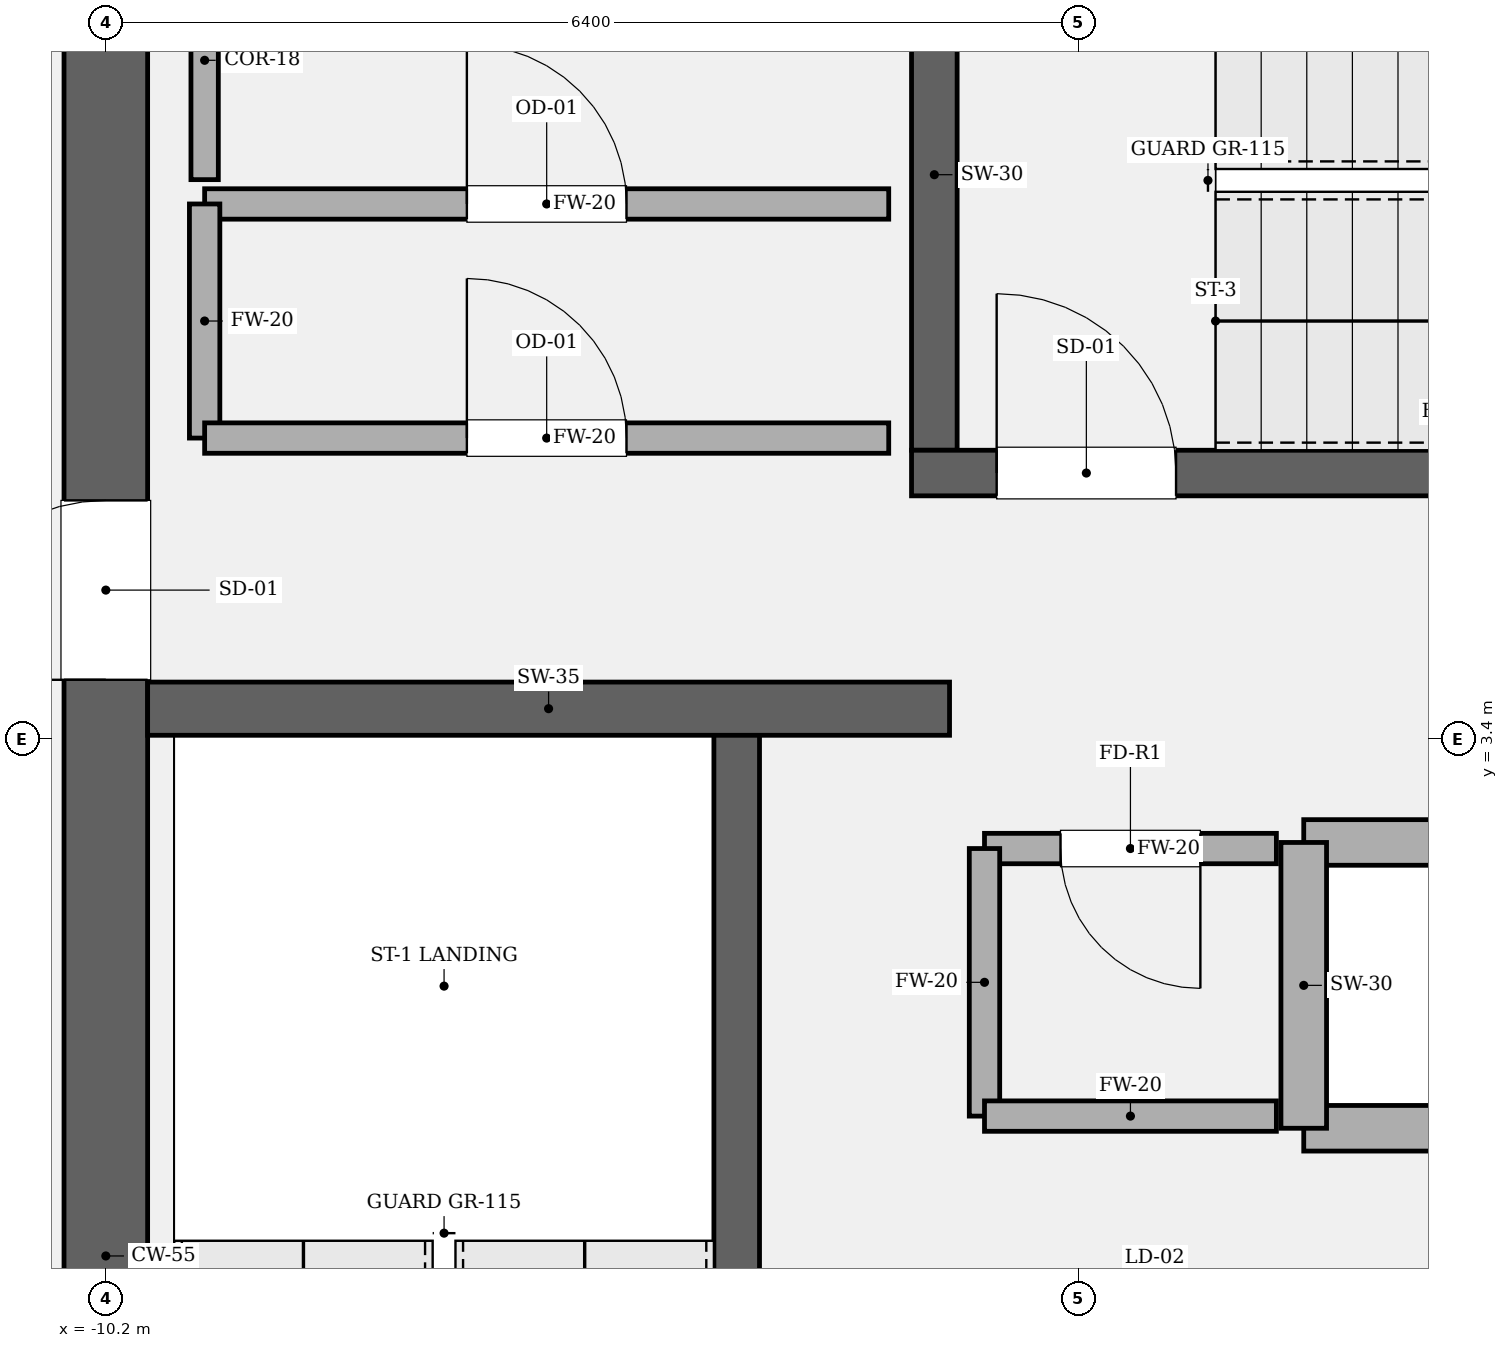
"""IFC4 building model, lengths in metres.
Left out: names, types, materials, properties, quantities, classifications, styles, units other than length and angle.
Written with IfcOpenShell. Run it as: python <this file> out.ifc"""

import sys

from ifc_helpers import new_model, si_unit, direction, frame, frame_2d, origin, place, context, subcontext, project, spatial, rectangle, extrude, element, fill, save


model = new_model("IFC4")
c1 = context("Model", 3, precision=1e-05, world=origin(), true_north=direction((0.0, 1.0)))
c2 = subcontext(c1, "Body", "Model", "MODEL_VIEW")
j1 = project(units=[si_unit("LENGTHUNIT", "METRE"), si_unit("PLANEANGLEUNIT", "RADIAN")], contexts=[c1])
p1 = place(None, origin())
s1 = spatial("IfcSite", under=j1, at=p1, CompositionType="ELEMENT")
p2 = place(p1, origin())
s2 = spatial("IfcBuilding", under=s1, at=p2, CompositionType="ELEMENT")
p3 = place(p2, frame((0.0, 0.0, 267.6)))
s3 = spatial("IfcBuildingStorey", under=s2, at=p3, CompositionType="ELEMENT", Elevation=267.6)
p4 = place(p3, frame((-10.2, -8.925, 0.0), z_axis=(0.0, 0.0, 1.0), x_axis=(0.0, 1.0, 0.0)))
e1 = element("IfcWall", 1, at=p4, inside=s3, PredefinedType="SHEAR", context=c2, shape_type="SweptSolid", body=[
    extrude(rectangle(XDim=17.85, YDim=0.55, at=frame_2d((8.925, 0.0))), origin(), (0.0, 0.0, 1.0), 4.05),
])
p5 = place(p4, frame((12.715, 0.0, 0.0)))
e2 = element("IfcOpeningElement", 2, at=p5, cuts=e1, PredefinedType="OPENING", context=c2, shape_type="SweptSolid", body=[
    extrude(rectangle(XDim=1.18, YDim=2.2, at=frame_2d((0.59, 1.1))), frame((0.0, 0.285, 0.0), z_axis=(0.0, -1.0, 0.0), x_axis=(1.0, 0.0, 0.0)), (0.0, 0.0, 1.0), 0.57),
])
p6 = place(p3, frame((-6.05, -5.5, 0.0), z_axis=(0.0, 0.0, 1.0), x_axis=(0.0, 1.0, 0.0)))
e3 = element("IfcWall", 3, at=p6, inside=s3, PredefinedType="SOLIDWALL", context=c2, shape_type="SweptSolid", body=[
    extrude(rectangle(XDim=8.95, YDim=0.3, at=frame_2d((4.475, 0.0))), origin(), (0.0, 0.0, 1.0), 4.05),
])
p7 = place(p3, frame((-4.75, 5.3, 0.0), z_axis=(0.0, 0.0, 1.0), x_axis=(0.0, 1.0, 0.0)))
e4 = element("IfcWall", 4, at=p7, inside=s3, PredefinedType="SOLIDWALL", context=c2, shape_type="SweptSolid", body=[
    extrude(rectangle(XDim=3.625, YDim=0.3, at=frame_2d((1.812, 0.0))), origin(), (0.0, 0.0, 1.0), 4.05),
])
p8 = place(p3, frame((-4.9, 5.15, 0.0), z_axis=(0.0, 0.0, 1.0), x_axis=(1.0, 0.0, 0.0)))
e5 = element("IfcWall", 5, at=p8, inside=s3, PredefinedType="SOLIDWALL", context=c2, shape_type="SweptSolid", body=[
    extrude(rectangle(XDim=9.8, YDim=0.3, at=frame_2d((4.9, 0.0))), origin(), (0.0, 0.0, 1.0), 4.05),
])
p9 = place(p8, frame((0.56, 0.0, 0.0)))
e6 = element("IfcOpeningElement", 6, at=p9, cuts=e5, PredefinedType="OPENING", context=c2, shape_type="SweptSolid", body=[
    extrude(rectangle(XDim=1.18, YDim=2.2, at=frame_2d((0.59, 1.1))), frame((0.0, 0.16, 0.0), z_axis=(0.0, -1.0, 0.0), x_axis=(1.0, 0.0, 0.0)), (0.0, 0.0, 1.0), 0.32),
])
p10 = place(p3, frame((-9.925, 3.6, 0.0), z_axis=(0.0, 0.0, 1.0), x_axis=(1.0, 0.0, 0.0)))
e7 = element("IfcWall", 7, at=p10, inside=s3, PredefinedType="SOLIDWALL", context=c2, shape_type="SweptSolid", body=[
    extrude(rectangle(XDim=5.275, YDim=0.35, at=frame_2d((2.638, 0.0))), origin(), (0.0, 0.0, 1.0), 4.05),
])
for number, where, z_axis, x_axis in (
    (8, (-2.32, 0.84, 0.0), (0.0, 0.0, 1.0), (1.0, 0.0, 0.0)),
    (9, (-2.32, 2.72, 0.0), (0.0, 0.0, 1.0), (1.0, 0.0, 0.0)),
):
    element("IfcWall", number, at=place(p3, frame(where, z_axis=z_axis, x_axis=x_axis)), inside=s3, PredefinedType="SOLIDWALL", context=c2, shape_type="SweptSolid", body=[
        extrude(rectangle(XDim=4.64, YDim=0.3, at=frame_2d((2.32, 0.0))), origin(), (0.0, 0.0, 1.0), 3.85),
    ])
p11 = place(p3, frame((-2.32, 0.84, 0.0), z_axis=(0.0, 0.0, 1.0), x_axis=(0.0, 1.0, 0.0)))
e10 = element("IfcWall", 10, at=p11, inside=s3, PredefinedType="SOLIDWALL", context=c2, shape_type="SweptSolid", body=[
    extrude(rectangle(XDim=1.88, YDim=0.3, at=frame_2d((0.94, 0.0))), origin(), (0.0, 0.0, 1.0), 3.85),
])
p12 = place(p3, frame((-2.5, 2.68, 0.0), z_axis=(0.0, 0.0, 1.0), x_axis=(-1.0, 0.0, 0.0)))
e11 = element("IfcWall", 11, at=p12, inside=s3, PredefinedType="SOLIDWALL", context=c2, shape_type="SweptSolid", body=[
    extrude(rectangle(XDim=1.92, YDim=0.2, at=frame_2d((0.96, 0.0))), origin(), (0.0, 0.0, 1.0), 3.85),
])
p13 = place(p12, frame((0.5, 0.0, 0.0)))
e12 = element("IfcOpeningElement", 12, at=p13, cuts=e11, PredefinedType="OPENING", context=c2, shape_type="SweptSolid", body=[
    extrude(rectangle(XDim=0.92, YDim=2.1, at=frame_2d((0.46, 1.05))), frame((0.0, 0.11, 0.0), z_axis=(0.0, -1.0, 0.0), x_axis=(1.0, 0.0, 0.0)), (0.0, 0.0, 1.0), 0.22),
])
p14 = place(p3, frame((-4.42, 2.68, 0.0), z_axis=(0.0, 0.0, 1.0), x_axis=(0.0, -1.0, 0.0)))
e13 = element("IfcWall", 13, at=p14, inside=s3, PredefinedType="SOLIDWALL", context=c2, shape_type="SweptSolid", body=[
    extrude(rectangle(XDim=1.76, YDim=0.2, at=frame_2d((0.88, 0.0))), origin(), (0.0, 0.0, 1.0), 3.85),
])
p15 = place(p3, frame((-4.42, 0.92, 0.0), z_axis=(0.0, 0.0, 1.0), x_axis=(1.0, 0.0, 0.0)))
e14 = element("IfcWall", 14, at=p15, inside=s3, PredefinedType="SOLIDWALL", context=c2, shape_type="SweptSolid", body=[
    extrude(rectangle(XDim=1.92, YDim=0.2, at=frame_2d((0.96, 0.0))), origin(), (0.0, 0.0, 1.0), 3.85),
])
p16 = place(p3, frame((-5.05, 6.92, 0.0), z_axis=(0.0, 0.0, 1.0), x_axis=(-1.0, 0.0, 0.0)))
e15 = element("IfcWall", 15, at=p16, inside=s3, PredefinedType="SOLIDWALL", context=c2, shape_type="SweptSolid", body=[
    extrude(rectangle(XDim=4.5, YDim=0.2, at=frame_2d((2.25, 0.0))), origin(), (0.0, 0.0, 1.0), 3.85),
])
p17 = place(p16, frame((1.725, 0.0, 0.0)))
e16 = element("IfcOpeningElement", 16, at=p17, cuts=e15, PredefinedType="OPENING", context=c2, shape_type="SweptSolid", body=[
    extrude(rectangle(XDim=1.05, YDim=2.2, at=frame_2d((0.525, 1.1))), frame((0.0, 0.11, 0.0), z_axis=(0.0, -1.0, 0.0), x_axis=(1.0, 0.0, 0.0)), (0.0, 0.0, 1.0), 0.22),
])
p18 = place(p3, frame((-9.55, 6.92, 0.0), z_axis=(0.0, 0.0, 1.0), x_axis=(0.0, -1.0, 0.0)))
e17 = element("IfcWall", 17, at=p18, inside=s3, PredefinedType="SOLIDWALL", context=c2, shape_type="SweptSolid", body=[
    extrude(rectangle(XDim=1.54, YDim=0.2, at=frame_2d((0.77, 0.0))), origin(), (0.0, 0.0, 1.0), 3.85),
])
p19 = place(p3, frame((-9.55, 5.38, 0.0), z_axis=(0.0, 0.0, 1.0), x_axis=(1.0, 0.0, 0.0)))
e18 = element("IfcWall", 18, at=p19, inside=s3, PredefinedType="SOLIDWALL", context=c2, shape_type="SweptSolid", body=[
    extrude(rectangle(XDim=4.5, YDim=0.2, at=frame_2d((2.25, 0.0))), origin(), (0.0, 0.0, 1.0), 3.85),
])
p20 = place(p19, frame((1.725, 0.0, 0.0)))
e19 = element("IfcOpeningElement", 19, at=p20, cuts=e18, PredefinedType="OPENING", context=c2, shape_type="SweptSolid", body=[
    extrude(rectangle(XDim=1.05, YDim=2.2, at=frame_2d((0.525, 1.1))), frame((0.0, 0.11, 0.0), z_axis=(0.0, -1.0, 0.0), x_axis=(1.0, 0.0, 0.0)), (0.0, 0.0, 1.0), 0.22),
])
p21 = place(p3, frame((-9.55, 8.65, 0.0), z_axis=(0.0, 0.0, 1.0), x_axis=(0.0, -1.0, 0.0)))
e20 = element("IfcWall", 20, at=p21, inside=s3, PredefinedType="PARTITIONING", context=c2, shape_type="SweptSolid", body=[
    extrude(rectangle(XDim=1.57, YDim=0.18, at=frame_2d((0.785, 0.0))), origin(), (0.0, 0.0, 1.0), 3.85),
])
p22 = place(p9, origin())
e21 = element("IfcDoor", 21, at=p22, inside=s3, OperationType="SINGLE_SWING_LEFT", PredefinedType="DOOR", context=c2, shape_type="SweptSolid", body=[
    extrude(rectangle(XDim=1.18, YDim=2.2, at=frame_2d((0.59, 1.1))), frame((0.0, 0.025, 0.0), z_axis=(0.0, -1.0, 0.0), x_axis=(1.0, 0.0, 0.0)), (0.0, 0.0, 1.0), 0.05),
])
fill(e6, e21)
p23 = place(p5, origin())
e22 = element("IfcDoor", 22, at=p23, inside=s3, OperationType="SINGLE_SWING_LEFT", PredefinedType="DOOR", context=c2, shape_type="SweptSolid", body=[
    extrude(rectangle(XDim=1.18, YDim=2.2, at=frame_2d((0.59, 1.1))), frame((0.0, 0.025, 0.0), z_axis=(0.0, -1.0, 0.0), x_axis=(1.0, 0.0, 0.0)), (0.0, 0.0, 1.0), 0.05),
])
fill(e2, e22)
p24 = place(p13, origin())
e23 = element("IfcDoor", 23, at=p24, inside=s3, OperationType="SINGLE_SWING_LEFT", PredefinedType="DOOR", context=c2, shape_type="SweptSolid", body=[
    extrude(rectangle(XDim=0.92, YDim=2.1, at=frame_2d((0.46, 1.05))), frame((0.0, 0.025, 0.0), z_axis=(0.0, -1.0, 0.0), x_axis=(1.0, 0.0, 0.0)), (0.0, 0.0, 1.0), 0.05),
])
fill(e12, e23)
p25 = place(p20, origin())
e24 = element("IfcDoor", 24, at=p25, inside=s3, OperationType="SINGLE_SWING_LEFT", PredefinedType="DOOR", context=c2, shape_type="SweptSolid", body=[
    extrude(rectangle(XDim=1.05, YDim=2.2, at=frame_2d((0.525, 1.1))), frame((0.0, 0.025, 0.0), z_axis=(0.0, -1.0, 0.0), x_axis=(1.0, 0.0, 0.0)), (0.0, 0.0, 1.0), 0.05),
])
fill(e19, e24)
p26 = place(p17, origin())
e25 = element("IfcDoor", 25, at=p26, inside=s3, OperationType="SINGLE_SWING_RIGHT", PredefinedType="DOOR", context=c2, shape_type="SweptSolid", body=[
    extrude(rectangle(XDim=1.05, YDim=2.2, at=frame_2d((0.525, 1.1))), frame((0.0, 0.025, 0.0), z_axis=(0.0, -1.0, 0.0), x_axis=(1.0, 0.0, 0.0)), (0.0, 0.0, 1.0), 0.05),
])
fill(e16, e25)
save(model, sys.argv[1])
